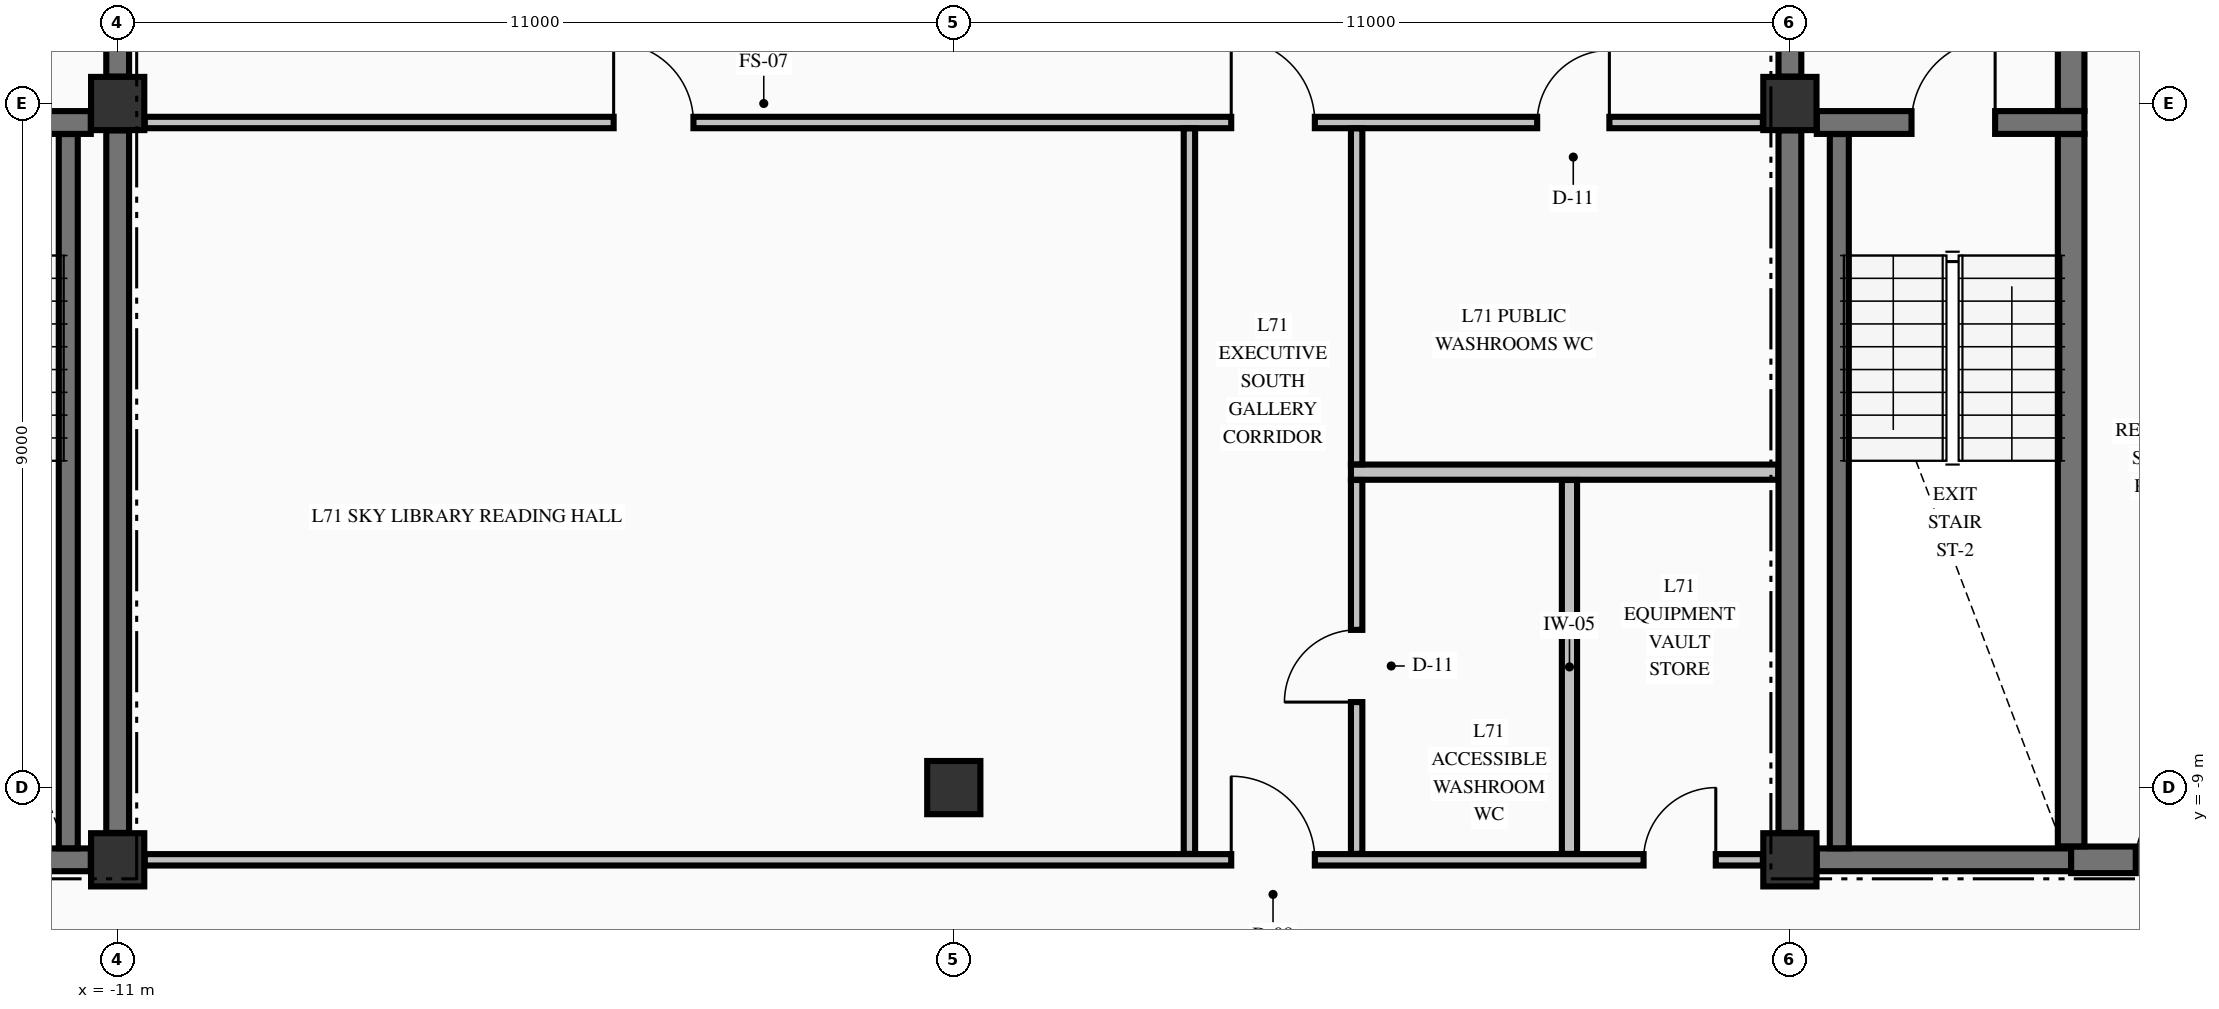
"""IFC4 building model, lengths in metres.
Left out: names, types, materials, properties, quantities, classifications, styles, units other than length and angle.
Written with IfcOpenShell. Run it as: python <this file> out.ifc"""

import sys

from ifc_helpers import new_model, si_unit, direction, frame, frame_2d, origin, origin_2d, place, context, subcontext, project, spatial, rectangle, extrude, element, fill, save


model = new_model("IFC4")
c1 = context("Model", 3, precision=1e-05, world=origin(), true_north=direction((0.0, 1.0)))
c2 = subcontext(c1, "Body", "Model", "MODEL_VIEW")
j1 = project(units=[si_unit("LENGTHUNIT", "METRE"), si_unit("PLANEANGLEUNIT", "RADIAN")], contexts=[c1])
p1 = place(None, origin())
s1 = spatial("IfcSite", under=j1, at=p1, CompositionType="ELEMENT")
p2 = place(p1, origin())
s2 = spatial("IfcBuilding", under=s1, at=p2, CompositionType="ELEMENT")
p3 = place(p2, frame((0.0, 0.0, 267.35)))
s3 = spatial("IfcBuildingStorey", under=s2, at=p3, CompositionType="ELEMENT", Elevation=267.35)
for number, where, z_axis, x_axis in (
    (1, (-11.0, -9.95, -0.25), (0.0, 0.0, 1.0), (1.0, 0.0, 0.0)),
    (2, (-11.0, 0.0, -0.25), (0.0, 0.0, 1.0), (1.0, 0.0, 0.0)),
    (3, (11.0, -9.95, -0.25), (0.0, 0.0, 1.0), (1.0, 0.0, 0.0)),
    (4, (11.0, 0.0, -0.25), (0.0, 0.0, 1.0), (1.0, 0.0, 0.0)),
    (5, (0.0, -9.0, -0.25), (0.0, 0.0, 1.0), (1.0, 0.0, 0.0)),
):
    element("IfcColumn", number, at=place(p3, frame(where, z_axis=z_axis, x_axis=x_axis)), inside=s3, PredefinedType="COLUMN", context=c2, shape_type="SweptSolid", body=[
        extrude(rectangle(XDim=0.7, YDim=0.7, at=origin_2d()), origin(), (0.0, 0.0, 1.0), 3.155),
    ])
for number, where, z_axis, x_axis in (
    (6, (-14.7, -9.95, 0.0), (0.0, 0.0, 1.0), (1.0, 0.0, 0.0)),
    (7, (11.354, -9.95, 0.0), (0.0, 0.0, 1.0), (1.0, 0.0, 0.0)),
):
    element("IfcWall", number, at=place(p3, frame(where, z_axis=z_axis, x_axis=x_axis)), inside=s3, PredefinedType="SHEAR", context=c2, shape_type="SweptSolid", body=[
        extrude(rectangle(XDim=3.346, YDim=0.3, at=frame_2d((1.673, 0.0))), origin(), (0.0, 0.0, 1.0), 2.905),
    ])
p4 = place(p3, frame((14.7, -9.95, 0.0), z_axis=(0.0, 0.0, 1.0), x_axis=(1.0, 0.0, 0.0)))
e8 = element("IfcWall", 8, at=p4, inside=s3, PredefinedType="SHEAR", context=c2, shape_type="SweptSolid", body=[
    extrude(rectangle(XDim=4.946, YDim=0.35, at=frame_2d((2.473, 0.0))), origin(), (0.0, 0.0, 1.0), 2.905),
])
p5 = place(p4, frame((0.85, 0.0, 0.0)))
e9 = element("IfcOpeningElement", 9, at=p5, cuts=e8, PredefinedType="OPENING", context=c2, shape_type="SweptSolid", body=[
    extrude(rectangle(XDim=0.9, YDim=2.15, at=frame_2d((0.45, 1.075))), frame((0.0, 0.185, 0.0), z_axis=(0.0, -1.0, 0.0), x_axis=(1.0, 0.0, 0.0)), (0.0, 0.0, 1.0), 0.37),
])
p6 = place(p4, frame((3.4, 0.0, 0.0)))
e10 = element("IfcOpeningElement", 10, at=p6, cuts=e8, PredefinedType="OPENING", context=c2, shape_type="SweptSolid", body=[
    extrude(rectangle(XDim=0.9, YDim=2.15, at=frame_2d((0.45, 1.075))), frame((0.0, 0.185, 0.0), z_axis=(0.0, -1.0, 0.0), x_axis=(1.0, 0.0, 0.0)), (0.0, 0.0, 1.0), 0.37),
])
p7 = place(p3, frame((-19.646, -0.25, 0.0), z_axis=(0.0, 0.0, 1.0), x_axis=(1.0, 0.0, 0.0)))
e11 = element("IfcWall", 11, at=p7, inside=s3, PredefinedType="SHEAR", context=c2, shape_type="SweptSolid", body=[
    extrude(rectangle(XDim=8.292, YDim=0.3, at=frame_2d((4.146, 0.0))), origin(), (0.0, 0.0, 1.0), 2.905),
])
p8 = place(p7, frame((5.946, 0.0, 0.0)))
e12 = element("IfcOpeningElement", 12, at=p8, cuts=e11, PredefinedType="OPENING", context=c2, shape_type="SweptSolid", body=[
    extrude(rectangle(XDim=1.1, YDim=2.15, at=frame_2d((0.55, 1.075))), frame((0.0, 0.16, 0.0), z_axis=(0.0, -1.0, 0.0), x_axis=(1.0, 0.0, 0.0)), (0.0, 0.0, 1.0), 0.32),
])
p9 = place(p3, frame((11.354, -0.25, 0.0), z_axis=(0.0, 0.0, 1.0), x_axis=(1.0, 0.0, 0.0)))
e13 = element("IfcWall", 13, at=p9, inside=s3, PredefinedType="SHEAR", context=c2, shape_type="SweptSolid", body=[
    extrude(rectangle(XDim=3.521, YDim=0.3, at=frame_2d((1.76, 0.0))), origin(), (0.0, 0.0, 1.0), 2.905),
])
p10 = place(p9, frame((1.246, 0.0, 0.0)))
e14 = element("IfcOpeningElement", 14, at=p10, cuts=e13, PredefinedType="OPENING", context=c2, shape_type="SweptSolid", body=[
    extrude(rectangle(XDim=1.1, YDim=2.15, at=frame_2d((0.55, 1.075))), frame((0.0, 0.16, 0.0), z_axis=(0.0, -1.0, 0.0), x_axis=(1.0, 0.0, 0.0)), (0.0, 0.0, 1.0), 0.32),
])
p11 = place(p3, frame((-10.644, -9.95, 0.0), z_axis=(0.0, 0.0, 1.0), x_axis=(1.0, 0.0, 0.0)))
e15 = element("IfcWall", 15, at=p11, inside=s3, PredefinedType="PARTITIONING", context=c2, shape_type="SweptSolid", body=[
    extrude(rectangle(XDim=21.288, YDim=0.15, at=frame_2d((10.644, 0.0))), origin(), (0.0, 0.0, 1.0), 2.905),
])
p12 = place(p11, frame((14.294, 0.0, 0.0)))
e16 = element("IfcOpeningElement", 16, at=p12, cuts=e15, PredefinedType="OPENING", context=c2, shape_type="SweptSolid", body=[
    extrude(rectangle(XDim=1.1, YDim=2.15, at=frame_2d((0.55, 1.075))), frame((0.0, 0.085, 0.0), z_axis=(0.0, -1.0, 0.0), x_axis=(1.0, 0.0, 0.0)), (0.0, 0.0, 1.0), 0.17),
])
p13 = place(p11, frame((19.719, 0.0, 0.0)))
e17 = element("IfcOpeningElement", 17, at=p13, cuts=e15, PredefinedType="OPENING", context=c2, shape_type="SweptSolid", body=[
    extrude(rectangle(XDim=0.95, YDim=2.15, at=frame_2d((0.475, 1.075))), frame((0.0, 0.085, 0.0), z_axis=(0.0, -1.0, 0.0), x_axis=(1.0, 0.0, 0.0)), (0.0, 0.0, 1.0), 0.17),
])
p14 = place(p3, frame((5.225, -4.85, 0.0), z_axis=(0.0, 0.0, 1.0), x_axis=(1.0, 0.0, 0.0)))
e18 = element("IfcWall", 18, at=p14, inside=s3, PredefinedType="PARTITIONING", context=c2, shape_type="SweptSolid", body=[
    extrude(rectangle(XDim=5.622, YDim=0.2, at=frame_2d((2.811, 0.0))), origin(), (0.0, 0.0, 1.0), 2.905),
])
p15 = place(p3, frame((-10.644, -0.25, 0.0), z_axis=(0.0, 0.0, 1.0), x_axis=(1.0, 0.0, 0.0)))
e19 = element("IfcWall", 19, at=p15, inside=s3, PredefinedType="PARTITIONING", context=c2, shape_type="SweptSolid", body=[
    extrude(rectangle(XDim=21.288, YDim=0.15, at=frame_2d((10.644, 0.0))), origin(), (0.0, 0.0, 1.0), 2.905),
])
p16 = place(p15, frame((14.294, 0.0, 0.0)))
e20 = element("IfcOpeningElement", 20, at=p16, cuts=e19, PredefinedType="OPENING", context=c2, shape_type="SweptSolid", body=[
    extrude(rectangle(XDim=1.1, YDim=2.15, at=frame_2d((0.55, 1.075))), frame((0.0, 0.085, 0.0), z_axis=(0.0, -1.0, 0.0), x_axis=(1.0, 0.0, 0.0)), (0.0, 0.0, 1.0), 0.17),
])
p17 = place(p15, frame((6.169, 0.0, 0.0)))
e21 = element("IfcOpeningElement", 21, at=p17, cuts=e19, PredefinedType="OPENING", context=c2, shape_type="SweptSolid", body=[
    extrude(rectangle(XDim=1.05, YDim=2.15, at=frame_2d((0.525, 1.075))), frame((0.0, 0.085, 0.0), z_axis=(0.0, -1.0, 0.0), x_axis=(1.0, 0.0, 0.0)), (0.0, 0.0, 1.0), 0.17),
])
p18 = place(p15, frame((18.319, 0.0, 0.0)))
e22 = element("IfcOpeningElement", 22, at=p18, cuts=e19, PredefinedType="OPENING", context=c2, shape_type="SweptSolid", body=[
    extrude(rectangle(XDim=0.95, YDim=2.15, at=frame_2d((0.475, 1.075))), frame((0.0, 0.085, 0.0), z_axis=(0.0, -1.0, 0.0), x_axis=(1.0, 0.0, 0.0)), (0.0, 0.0, 1.0), 0.17),
])
p19 = place(p3, frame((-11.65, -9.798, 0.0), z_axis=(0.0, 0.0, 1.0), x_axis=(0.0, 1.0, 0.0)))
e23 = element("IfcWall", 23, at=p19, inside=s3, PredefinedType="SOLIDWALL", context=c2, shape_type="SweptSolid", body=[
    extrude(rectangle(XDim=9.396, YDim=0.25, at=frame_2d((4.698, 0.0))), origin(), (0.0, 0.0, 1.0), 2.905),
])
p20 = place(p3, frame((-11.0, -9.596, 0.0), z_axis=(0.0, 0.0, 1.0), x_axis=(0.0, 1.0, 0.0)))
e24 = element("IfcWall", 24, at=p20, inside=s3, PredefinedType="SHEAR", context=c2, shape_type="SweptSolid", body=[
    extrude(rectangle(XDim=9.242, YDim=0.3, at=frame_2d((4.621, 0.0))), origin(), (0.0, 0.0, 1.0), 2.905),
])
p21 = place(p3, frame((-11.0, 0.354, 0.0), z_axis=(0.0, 0.0, 1.0), x_axis=(0.0, 1.0, 0.0)))
e25 = element("IfcWall", 25, at=p21, inside=s3, PredefinedType="SHEAR", context=c2, shape_type="SweptSolid", body=[
    extrude(rectangle(XDim=2.394, YDim=0.3, at=frame_2d((1.197, 0.0))), origin(), (0.0, 0.0, 1.0), 2.905),
])
p22 = place(p21, frame((0.746, 0.0, 0.0)))
e26 = element("IfcOpeningElement", 26, at=p22, cuts=e25, PredefinedType="OPENING", context=c2, shape_type="SweptSolid", body=[
    extrude(rectangle(XDim=1.1, YDim=2.15, at=frame_2d((0.55, 1.075))), frame((0.0, 0.16, 0.0), z_axis=(0.0, -1.0, 0.0), x_axis=(1.0, 0.0, 0.0)), (0.0, 0.0, 1.0), 0.32),
])
p23 = place(p3, frame((11.0, -9.596, 0.0), z_axis=(0.0, 0.0, 1.0), x_axis=(0.0, 1.0, 0.0)))
e27 = element("IfcWall", 27, at=p23, inside=s3, PredefinedType="SHEAR", context=c2, shape_type="SweptSolid", body=[
    extrude(rectangle(XDim=9.242, YDim=0.3, at=frame_2d((4.621, 0.0))), origin(), (0.0, 0.0, 1.0), 2.905),
])
p24 = place(p3, frame((11.0, 0.354, 0.0), z_axis=(0.0, 0.0, 1.0), x_axis=(0.0, 1.0, 0.0)))
e28 = element("IfcWall", 28, at=p24, inside=s3, PredefinedType="SHEAR", context=c2, shape_type="SweptSolid", body=[
    extrude(rectangle(XDim=2.394, YDim=0.3, at=frame_2d((1.197, 0.0))), origin(), (0.0, 0.0, 1.0), 2.905),
])
p25 = place(p24, frame((0.746, 0.0, 0.0)))
e29 = element("IfcOpeningElement", 29, at=p25, cuts=e28, PredefinedType="OPENING", context=c2, shape_type="SweptSolid", body=[
    extrude(rectangle(XDim=1.1, YDim=2.15, at=frame_2d((0.55, 1.075))), frame((0.0, 0.16, 0.0), z_axis=(0.0, -1.0, 0.0), x_axis=(1.0, 0.0, 0.0)), (0.0, 0.0, 1.0), 0.32),
])
p26 = place(p3, frame((11.65, -9.798, 0.0), z_axis=(0.0, 0.0, 1.0), x_axis=(0.0, 1.0, 0.0)))
e30 = element("IfcWall", 30, at=p26, inside=s3, PredefinedType="SOLIDWALL", context=c2, shape_type="SweptSolid", body=[
    extrude(rectangle(XDim=9.396, YDim=0.25, at=frame_2d((4.698, 0.0))), origin(), (0.0, 0.0, 1.0), 2.905),
])
p27 = place(p3, frame((14.7, -9.773, 0.0), z_axis=(0.0, 0.0, 1.0), x_axis=(0.0, 1.0, 0.0)))
e31 = element("IfcWall", 31, at=p27, inside=s3, PredefinedType="SHEAR", context=c2, shape_type="SweptSolid", body=[
    extrude(rectangle(XDim=9.371, YDim=0.35, at=frame_2d((4.686, 0.0))), origin(), (0.0, 0.0, 1.0), 2.905),
])
p28 = place(p3, frame((14.7, -0.098, 0.0), z_axis=(0.0, 0.0, 1.0), x_axis=(0.0, 1.0, 0.0)))
e32 = element("IfcWall", 32, at=p28, inside=s3, PredefinedType="SHEAR", context=c2, shape_type="SweptSolid", body=[
    extrude(rectangle(XDim=2.846, YDim=0.35, at=frame_2d((1.423, 0.0))), origin(), (0.0, 0.0, 1.0), 2.905),
])
p29 = place(p3, frame((3.1, -9.872, 0.0), z_axis=(0.0, 0.0, 1.0), x_axis=(0.0, 1.0, 0.0)))
e33 = element("IfcWall", 33, at=p29, inside=s3, PredefinedType="PARTITIONING", context=c2, shape_type="SweptSolid", body=[
    extrude(rectangle(XDim=9.544, YDim=0.15, at=frame_2d((4.772, 0.0))), origin(), (0.0, 0.0, 1.0), 2.905),
])
p30 = place(p3, frame((5.3, -9.872, 0.0), z_axis=(0.0, 0.0, 1.0), x_axis=(0.0, 1.0, 0.0)))
e34 = element("IfcWall", 34, at=p30, inside=s3, PredefinedType="PARTITIONING", context=c2, shape_type="SweptSolid", body=[
    extrude(rectangle(XDim=4.919, YDim=0.15, at=frame_2d((2.459, 0.0))), origin(), (0.0, 0.0, 1.0), 2.905),
])
p31 = place(p30, frame((1.997, 0.0, 0.0)))
e35 = element("IfcOpeningElement", 35, at=p31, cuts=e34, PredefinedType="OPENING", context=c2, shape_type="SweptSolid", body=[
    extrude(rectangle(XDim=0.95, YDim=2.15, at=frame_2d((0.475, 1.075))), frame((0.0, 0.085, 0.0), z_axis=(0.0, -1.0, 0.0), x_axis=(1.0, 0.0, 0.0)), (0.0, 0.0, 1.0), 0.17),
])
p32 = place(p3, frame((5.3, -4.747, 0.0), z_axis=(0.0, 0.0, 1.0), x_axis=(0.0, 1.0, 0.0)))
e36 = element("IfcWall", 36, at=p32, inside=s3, PredefinedType="PARTITIONING", context=c2, shape_type="SweptSolid", body=[
    extrude(rectangle(XDim=4.419, YDim=0.15, at=frame_2d((2.209, 0.0))), origin(), (0.0, 0.0, 1.0), 2.905),
])
p33 = place(p3, frame((8.1, -9.872, 0.0), z_axis=(0.0, 0.0, 1.0), x_axis=(0.0, 1.0, 0.0)))
e37 = element("IfcWall", 37, at=p33, inside=s3, PredefinedType="PARTITIONING", context=c2, shape_type="SweptSolid", body=[
    extrude(rectangle(XDim=4.919, YDim=0.2, at=frame_2d((2.459, 0.0))), origin(), (0.0, 0.0, 1.0), 2.905),
])
p34 = place(p10, origin())
e38 = element("IfcDoor", 38, at=p34, inside=s3, OperationType="SINGLE_SWING_RIGHT", PredefinedType="DOOR", context=c2, shape_type="SweptSolid", body=[
    extrude(rectangle(XDim=1.1, YDim=2.15, at=frame_2d((0.55, 1.075))), frame((0.0, 0.025, 0.0), z_axis=(0.0, -1.0, 0.0), x_axis=(1.0, 0.0, 0.0)), (0.0, 0.0, 1.0), 0.05),
])
fill(e14, e38)
p35 = place(p5, origin())
e39 = element("IfcDoor", 39, at=p35, inside=s3, OperationType="SINGLE_SWING_RIGHT", PredefinedType="DOOR", context=c2, shape_type="SweptSolid", body=[
    extrude(rectangle(XDim=0.9, YDim=2.15, at=frame_2d((0.45, 1.075))), frame((0.0, 0.025, 0.0), z_axis=(0.0, -1.0, 0.0), x_axis=(1.0, 0.0, 0.0)), (0.0, 0.0, 1.0), 0.05),
])
fill(e9, e39)
p36 = place(p12, origin())
e40 = element("IfcDoor", 40, at=p36, inside=s3, OperationType="SINGLE_SWING_LEFT", PredefinedType="DOOR", context=c2, shape_type="SweptSolid", body=[
    extrude(rectangle(XDim=1.1, YDim=2.15, at=frame_2d((0.55, 1.075))), frame((0.0, 0.025, 0.0), z_axis=(0.0, -1.0, 0.0), x_axis=(1.0, 0.0, 0.0)), (0.0, 0.0, 1.0), 0.05),
])
fill(e16, e40)
p37 = place(p16, origin())
e41 = element("IfcDoor", 41, at=p37, inside=s3, OperationType="SINGLE_SWING_LEFT", PredefinedType="DOOR", context=c2, shape_type="SweptSolid", body=[
    extrude(rectangle(XDim=1.1, YDim=2.15, at=frame_2d((0.55, 1.075))), frame((0.0, 0.025, 0.0), z_axis=(0.0, -1.0, 0.0), x_axis=(1.0, 0.0, 0.0)), (0.0, 0.0, 1.0), 0.05),
])
fill(e20, e41)
p38 = place(p17, origin())
e42 = element("IfcDoor", 42, at=p38, inside=s3, OperationType="SINGLE_SWING_LEFT", PredefinedType="DOOR", context=c2, shape_type="SweptSolid", body=[
    extrude(rectangle(XDim=1.05, YDim=2.15, at=frame_2d((0.525, 1.075))), frame((0.0, 0.025, 0.0), z_axis=(0.0, -1.0, 0.0), x_axis=(1.0, 0.0, 0.0)), (0.0, 0.0, 1.0), 0.05),
])
fill(e21, e42)
p39 = place(p18, origin())
e43 = element("IfcDoor", 43, at=p39, inside=s3, OperationType="SINGLE_SWING_RIGHT", PredefinedType="DOOR", context=c2, shape_type="SweptSolid", body=[
    extrude(rectangle(XDim=0.95, YDim=2.15, at=frame_2d((0.475, 1.075))), frame((0.0, 0.025, 0.0), z_axis=(0.0, -1.0, 0.0), x_axis=(1.0, 0.0, 0.0)), (0.0, 0.0, 1.0), 0.05),
])
fill(e22, e43)
p40 = place(p31, origin())
e44 = element("IfcDoor", 44, at=p40, inside=s3, OperationType="SINGLE_SWING_LEFT", PredefinedType="DOOR", context=c2, shape_type="SweptSolid", body=[
    extrude(rectangle(XDim=0.95, YDim=2.15, at=frame_2d((0.475, 1.075))), frame((0.0, 0.025, 0.0), z_axis=(0.0, -1.0, 0.0), x_axis=(1.0, 0.0, 0.0)), (0.0, 0.0, 1.0), 0.05),
])
fill(e35, e44)
p41 = place(p13, origin())
e45 = element("IfcDoor", 45, at=p41, inside=s3, OperationType="SINGLE_SWING_RIGHT", PredefinedType="DOOR", context=c2, shape_type="SweptSolid", body=[
    extrude(rectangle(XDim=0.95, YDim=2.15, at=frame_2d((0.475, 1.075))), frame((0.0, 0.025, 0.0), z_axis=(0.0, -1.0, 0.0), x_axis=(1.0, 0.0, 0.0)), (0.0, 0.0, 1.0), 0.05),
])
fill(e17, e45)
save(model, sys.argv[1])
